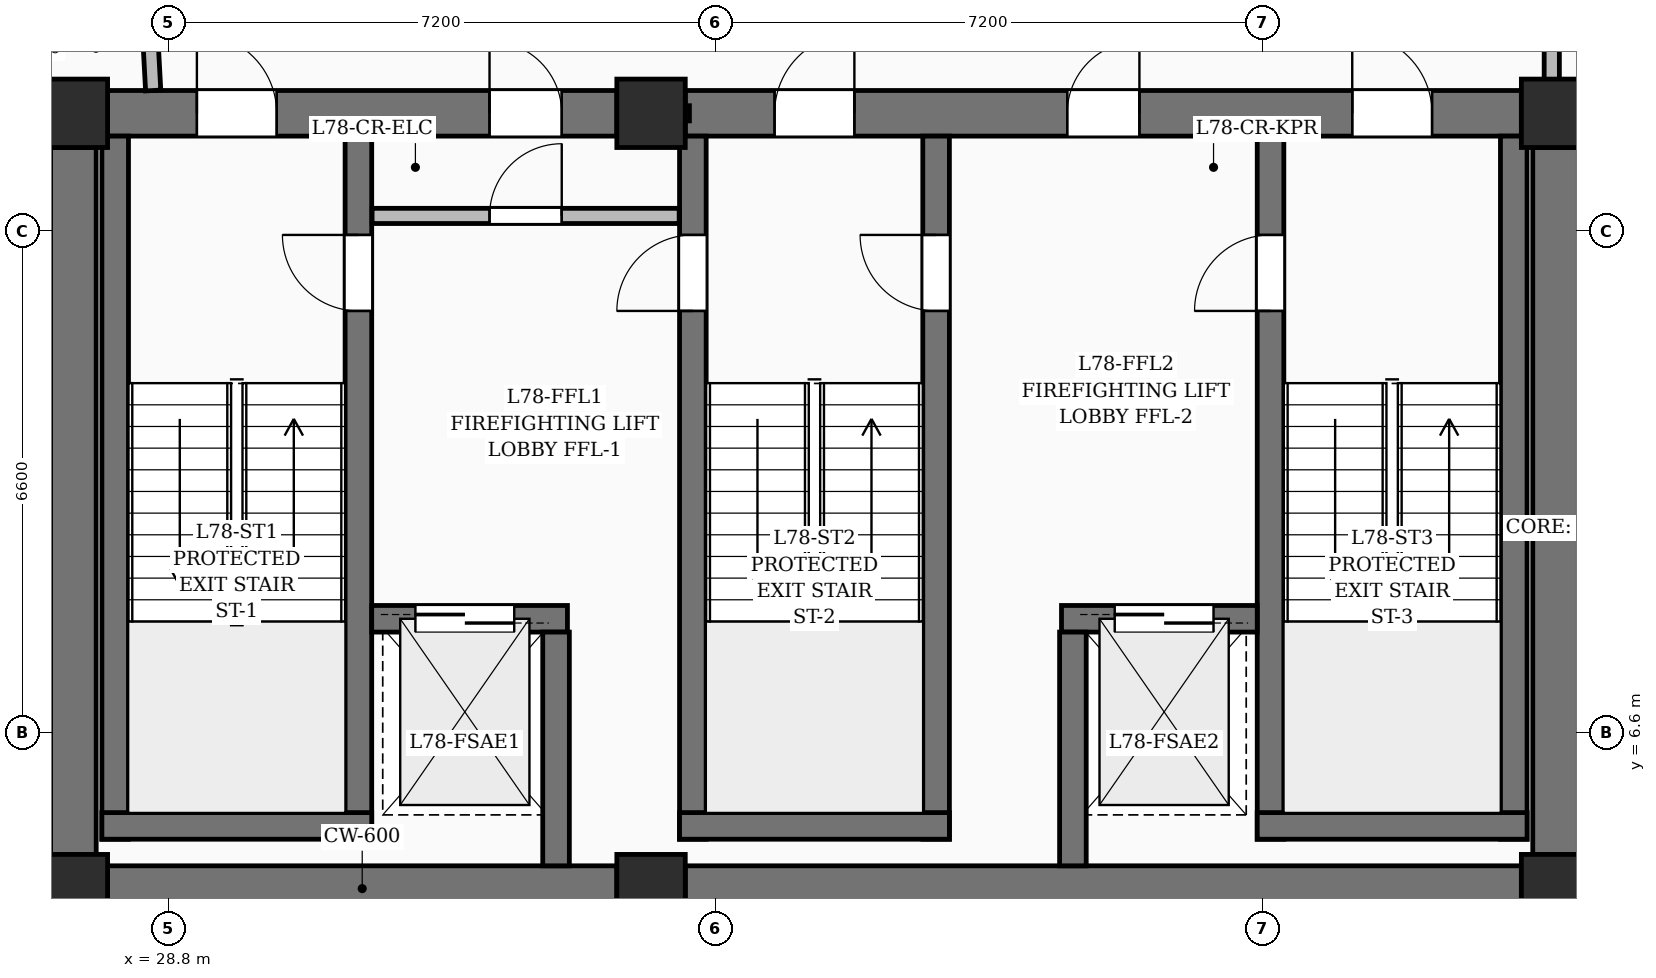
"""IFC4 building model, lengths in metres.
Left out: names, types, materials, properties, quantities, classifications, styles, units other than length and angle.
Written with IfcOpenShell. Run it as: python <this file> out.ifc"""

import sys

from ifc_helpers import new_model, si_unit, direction, frame, frame_2d, origin, origin_2d, place, context, subcontext, project, spatial, rectangle, extrude, element, fill, save


model = new_model("IFC4")
c1 = context("Model", 3, precision=1e-05, world=origin(), true_north=direction((0.0, 1.0)))
c2 = subcontext(c1, "Body", "Model", "MODEL_VIEW")
j1 = project(units=[si_unit("LENGTHUNIT", "METRE"), si_unit("PLANEANGLEUNIT", "RADIAN")], contexts=[c1])
p1 = place(None, origin())
s1 = spatial("IfcSite", under=j1, at=p1, CompositionType="ELEMENT")
p2 = place(p1, origin())
s2 = spatial("IfcBuilding", under=s1, at=p2, CompositionType="ELEMENT")
p3 = place(p2, frame((0.0, 0.0, 302.5)))
s3 = spatial("IfcBuildingStorey", under=s2, at=p3, CompositionType="ELEMENT", Elevation=302.5)
for number, where, z_axis, x_axis in (
    (1, (27.55, 4.55, 0.0), (0.0, 0.0, 1.0), (1.0, 0.0, 0.0)),
    (2, (35.15, 4.55, 0.0), (0.0, 0.0, 1.0), (1.0, 0.0, 0.0)),
    (3, (47.05, 4.55, 0.0), (0.0, 0.0, 1.0), (1.0, 0.0, 0.0)),
    (4, (27.55, 14.75, 0.0), (0.0, 0.0, 1.0), (1.0, 0.0, 0.0)),
    (5, (35.15, 14.75, 0.0), (0.0, 0.0, 1.0), (1.0, 0.0, 0.0)),
    (6, (47.05, 14.75, 0.0), (0.0, 0.0, 1.0), (1.0, 0.0, 0.0)),
):
    element("IfcColumn", number, at=place(p3, frame(where, z_axis=z_axis, x_axis=x_axis)), inside=s3, PredefinedType="COLUMN", context=c2, shape_type="SweptSolid", body=[
        extrude(rectangle(XDim=0.9, YDim=0.9, at=origin_2d()), origin(), (0.0, 0.0, 1.0), 4.0),
    ])
p4 = place(p3, frame((28.0, 4.55, 0.0), z_axis=(0.0, 0.0, 1.0), x_axis=(1.0, 0.0, 0.0)))
e7 = element("IfcWall", 7, at=p4, inside=s3, PredefinedType="SHEAR", context=c2, shape_type="SweptSolid", body=[
    extrude(rectangle(XDim=6.7, YDim=0.6, at=frame_2d((3.35, 0.0))), origin(), (0.0, 0.0, 1.0), 4.0),
])
p5 = place(p3, frame((35.6, 4.55, 0.0), z_axis=(0.0, 0.0, 1.0), x_axis=(1.0, 0.0, 0.0)))
e8 = element("IfcWall", 8, at=p5, inside=s3, PredefinedType="SHEAR", context=c2, shape_type="SweptSolid", body=[
    extrude(rectangle(XDim=11.0, YDim=0.6, at=frame_2d((5.5, 0.0))), origin(), (0.0, 0.0, 1.0), 4.0),
])
p6 = place(p3, frame((28.0, 14.75, 0.0), z_axis=(0.0, 0.0, 1.0), x_axis=(1.0, 0.0, 0.0)))
e9 = element("IfcWall", 9, at=p6, inside=s3, PredefinedType="SHEAR", context=c2, shape_type="SweptSolid", body=[
    extrude(rectangle(XDim=6.7, YDim=0.6, at=frame_2d((3.35, 0.0))), origin(), (0.0, 0.0, 1.0), 4.0),
])
p7 = place(p6, frame((1.175, 0.0, 0.0)))
e10 = element("IfcOpeningElement", 10, at=p7, cuts=e9, PredefinedType="OPENING", context=c2, shape_type="SweptSolid", body=[
    extrude(rectangle(XDim=1.05, YDim=2.15, at=frame_2d((0.525, 1.075))), frame((0.0, 0.31, 0.0), z_axis=(0.0, -1.0, 0.0), x_axis=(1.0, 0.0, 0.0)), (0.0, 0.0, 1.0), 0.62),
])
p8 = place(p6, frame((5.025, 0.0, 0.0)))
e11 = element("IfcOpeningElement", 11, at=p8, cuts=e9, PredefinedType="OPENING", context=c2, shape_type="SweptSolid", body=[
    extrude(rectangle(XDim=0.95, YDim=2.15, at=frame_2d((0.475, 1.075))), frame((0.0, 0.31, 0.0), z_axis=(0.0, -1.0, 0.0), x_axis=(1.0, 0.0, 0.0)), (0.0, 0.0, 1.0), 0.62),
])
p9 = place(p3, frame((35.6, 14.75, 0.0), z_axis=(0.0, 0.0, 1.0), x_axis=(1.0, 0.0, 0.0)))
e12 = element("IfcWall", 12, at=p9, inside=s3, PredefinedType="SHEAR", context=c2, shape_type="SweptSolid", body=[
    extrude(rectangle(XDim=11.0, YDim=0.6, at=frame_2d((5.5, 0.0))), origin(), (0.0, 0.0, 1.0), 4.0),
])
p10 = place(p9, frame((1.175, 0.0, 0.0)))
e13 = element("IfcOpeningElement", 13, at=p10, cuts=e12, PredefinedType="OPENING", context=c2, shape_type="SweptSolid", body=[
    extrude(rectangle(XDim=1.05, YDim=2.15, at=frame_2d((0.525, 1.075))), frame((0.0, 0.31, 0.0), z_axis=(0.0, -1.0, 0.0), x_axis=(1.0, 0.0, 0.0)), (0.0, 0.0, 1.0), 0.62),
])
p11 = place(p9, frame((8.775, 0.0, 0.0)))
e14 = element("IfcOpeningElement", 14, at=p11, cuts=e12, PredefinedType="OPENING", context=c2, shape_type="SweptSolid", body=[
    extrude(rectangle(XDim=1.05, YDim=2.15, at=frame_2d((0.525, 1.075))), frame((0.0, 0.31, 0.0), z_axis=(0.0, -1.0, 0.0), x_axis=(1.0, 0.0, 0.0)), (0.0, 0.0, 1.0), 0.62),
])
p12 = place(p9, frame((5.025, 0.0, 0.0)))
e15 = element("IfcOpeningElement", 15, at=p12, cuts=e12, PredefinedType="OPENING", context=c2, shape_type="SweptSolid", body=[
    extrude(rectangle(XDim=0.95, YDim=2.15, at=frame_2d((0.475, 1.075))), frame((0.0, 0.31, 0.0), z_axis=(0.0, -1.0, 0.0), x_axis=(1.0, 0.0, 0.0)), (0.0, 0.0, 1.0), 0.62),
])
for number, where, z_axis, x_axis in (
    (16, (27.55, 5.0, 0.0), (0.0, 0.0, 1.0), (0.0, 1.0, 0.0)),
    (17, (47.05, 5.0, 0.0), (0.0, 0.0, 1.0), (0.0, 1.0, 0.0)),
):
    element("IfcWall", number, at=place(p3, frame(where, z_axis=z_axis, x_axis=x_axis)), inside=s3, PredefinedType="SHEAR", context=c2, shape_type="SweptSolid", body=[
        extrude(rectangle(XDim=9.3, YDim=0.6, at=frame_2d((4.65, 0.0))), origin(), (0.0, 0.0, 1.0), 4.0),
    ])
p13 = place(p3, frame((28.1, 5.2, 0.0), z_axis=(0.0, 0.0, 1.0), x_axis=(0.0, 1.0, 0.0)))
e18 = element("IfcWall", 18, at=p13, inside=s3, PredefinedType="SOLIDWALL", context=c2, shape_type="SweptSolid", body=[
    extrude(rectangle(XDim=9.25, YDim=0.35, at=frame_2d((4.625, 0.0))), origin(), (0.0, 0.0, 1.0), 4.0),
])
p14 = place(p3, frame((31.3, 5.2, 0.0), z_axis=(0.0, 0.0, 1.0), x_axis=(0.0, 1.0, 0.0)))
e19 = element("IfcWall", 19, at=p14, inside=s3, PredefinedType="SOLIDWALL", context=c2, shape_type="SweptSolid", body=[
    extrude(rectangle(XDim=9.25, YDim=0.35, at=frame_2d((4.625, 0.0))), origin(), (0.0, 0.0, 1.0), 4.0),
])
p15 = place(p14, frame((6.95, 0.0, 0.0)))
e20 = element("IfcOpeningElement", 20, at=p15, cuts=e19, PredefinedType="OPENING", context=c2, shape_type="SweptSolid", body=[
    extrude(rectangle(XDim=1.0, YDim=2.15, at=frame_2d((0.5, 1.075))), frame((0.0, 0.185, 0.0), z_axis=(0.0, -1.0, 0.0), x_axis=(1.0, 0.0, 0.0)), (0.0, 0.0, 1.0), 0.37),
])
p16 = place(p3, frame((27.925, 5.375, 0.0), z_axis=(0.0, 0.0, 1.0), x_axis=(1.0, 0.0, 0.0)))
e21 = element("IfcWall", 21, at=p16, inside=s3, PredefinedType="SOLIDWALL", context=c2, shape_type="SweptSolid", body=[
    extrude(rectangle(XDim=3.55, YDim=0.35, at=frame_2d((1.775, 0.0))), origin(), (0.0, 0.0, 1.0), 4.0),
])
p17 = place(p3, frame((35.7, 5.2, 0.0), z_axis=(0.0, 0.0, 1.0), x_axis=(0.0, 1.0, 0.0)))
e22 = element("IfcWall", 22, at=p17, inside=s3, PredefinedType="SOLIDWALL", context=c2, shape_type="SweptSolid", body=[
    extrude(rectangle(XDim=9.25, YDim=0.35, at=frame_2d((4.625, 0.0))), origin(), (0.0, 0.0, 1.0), 4.0),
])
p18 = place(p17, frame((6.95, 0.0, 0.0)))
e23 = element("IfcOpeningElement", 23, at=p18, cuts=e22, PredefinedType="OPENING", context=c2, shape_type="SweptSolid", body=[
    extrude(rectangle(XDim=1.0, YDim=2.15, at=frame_2d((0.5, 1.075))), frame((0.0, 0.185, 0.0), z_axis=(0.0, -1.0, 0.0), x_axis=(1.0, 0.0, 0.0)), (0.0, 0.0, 1.0), 0.37),
])
p19 = place(p3, frame((38.9, 5.2, 0.0), z_axis=(0.0, 0.0, 1.0), x_axis=(0.0, 1.0, 0.0)))
e24 = element("IfcWall", 24, at=p19, inside=s3, PredefinedType="SOLIDWALL", context=c2, shape_type="SweptSolid", body=[
    extrude(rectangle(XDim=9.25, YDim=0.35, at=frame_2d((4.625, 0.0))), origin(), (0.0, 0.0, 1.0), 4.0),
])
p20 = place(p19, frame((6.95, 0.0, 0.0)))
e25 = element("IfcOpeningElement", 25, at=p20, cuts=e24, PredefinedType="OPENING", context=c2, shape_type="SweptSolid", body=[
    extrude(rectangle(XDim=1.0, YDim=2.15, at=frame_2d((0.5, 1.075))), frame((0.0, 0.185, 0.0), z_axis=(0.0, -1.0, 0.0), x_axis=(1.0, 0.0, 0.0)), (0.0, 0.0, 1.0), 0.37),
])
p21 = place(p3, frame((35.525, 5.375, 0.0), z_axis=(0.0, 0.0, 1.0), x_axis=(1.0, 0.0, 0.0)))
e26 = element("IfcWall", 26, at=p21, inside=s3, PredefinedType="SOLIDWALL", context=c2, shape_type="SweptSolid", body=[
    extrude(rectangle(XDim=3.55, YDim=0.35, at=frame_2d((1.775, 0.0))), origin(), (0.0, 0.0, 1.0), 4.0),
])
p22 = place(p3, frame((43.3, 5.2, 0.0), z_axis=(0.0, 0.0, 1.0), x_axis=(0.0, 1.0, 0.0)))
e27 = element("IfcWall", 27, at=p22, inside=s3, PredefinedType="SOLIDWALL", context=c2, shape_type="SweptSolid", body=[
    extrude(rectangle(XDim=9.25, YDim=0.35, at=frame_2d((4.625, 0.0))), origin(), (0.0, 0.0, 1.0), 4.0),
])
p23 = place(p22, frame((6.95, 0.0, 0.0)))
e28 = element("IfcOpeningElement", 28, at=p23, cuts=e27, PredefinedType="OPENING", context=c2, shape_type="SweptSolid", body=[
    extrude(rectangle(XDim=1.0, YDim=2.15, at=frame_2d((0.5, 1.075))), frame((0.0, 0.185, 0.0), z_axis=(0.0, -1.0, 0.0), x_axis=(1.0, 0.0, 0.0)), (0.0, 0.0, 1.0), 0.37),
])
p24 = place(p3, frame((46.5, 5.2, 0.0), z_axis=(0.0, 0.0, 1.0), x_axis=(0.0, 1.0, 0.0)))
e29 = element("IfcWall", 29, at=p24, inside=s3, PredefinedType="SOLIDWALL", context=c2, shape_type="SweptSolid", body=[
    extrude(rectangle(XDim=9.25, YDim=0.35, at=frame_2d((4.625, 0.0))), origin(), (0.0, 0.0, 1.0), 4.0),
])
p25 = place(p3, frame((43.125, 5.375, 0.0), z_axis=(0.0, 0.0, 1.0), x_axis=(1.0, 0.0, 0.0)))
e30 = element("IfcWall", 30, at=p25, inside=s3, PredefinedType="SOLIDWALL", context=c2, shape_type="SweptSolid", body=[
    extrude(rectangle(XDim=3.55, YDim=0.35, at=frame_2d((1.775, 0.0))), origin(), (0.0, 0.0, 1.0), 4.0),
])
p26 = place(p3, frame((31.475, 8.1, 0.0), z_axis=(0.0, 0.0, 1.0), x_axis=(1.0, 0.0, 0.0)))
e31 = element("IfcWall", 31, at=p26, inside=s3, PredefinedType="SOLIDWALL", context=c2, shape_type="SweptSolid", body=[
    extrude(rectangle(XDim=2.575, YDim=0.35, at=frame_2d((1.288, 0.0))), origin(), (0.0, 0.0, 1.0), 4.0),
])
p27 = place(p26, frame((0.575, 0.0, 0.0)))
e32 = element("IfcOpeningElement", 32, at=p27, cuts=e31, PredefinedType="OPENING", context=c2, shape_type="SweptSolid", body=[
    extrude(rectangle(XDim=1.3, YDim=2.25, at=frame_2d((0.65, 1.125))), frame((0.0, 0.185, 0.0), z_axis=(0.0, -1.0, 0.0), x_axis=(1.0, 0.0, 0.0)), (0.0, 0.0, 1.0), 0.37),
])
p28 = place(p3, frame((40.55, 8.1, 0.0), z_axis=(0.0, 0.0, 1.0), x_axis=(1.0, 0.0, 0.0)))
e33 = element("IfcWall", 33, at=p28, inside=s3, PredefinedType="SOLIDWALL", context=c2, shape_type="SweptSolid", body=[
    extrude(rectangle(XDim=2.575, YDim=0.35, at=frame_2d((1.288, 0.0))), origin(), (0.0, 0.0, 1.0), 4.0),
])
p29 = place(p28, frame((0.7, 0.0, 0.0)))
e34 = element("IfcOpeningElement", 34, at=p29, cuts=e33, PredefinedType="OPENING", context=c2, shape_type="SweptSolid", body=[
    extrude(rectangle(XDim=1.3, YDim=2.25, at=frame_2d((0.65, 1.125))), frame((0.0, 0.185, 0.0), z_axis=(0.0, -1.0, 0.0), x_axis=(1.0, 0.0, 0.0)), (0.0, 0.0, 1.0), 0.37),
])
for number, where, z_axis, x_axis in (
    (35, (33.9, 4.85, 0.0), (0.0, 0.0, 1.0), (0.0, 1.0, 0.0)),
    (36, (40.7, 4.85, 0.0), (0.0, 0.0, 1.0), (0.0, 1.0, 0.0)),
):
    element("IfcWall", number, at=place(p3, frame(where, z_axis=z_axis, x_axis=x_axis)), inside=s3, PredefinedType="SOLIDWALL", context=c2, shape_type="SweptSolid", body=[
        extrude(rectangle(XDim=3.075, YDim=0.35, at=frame_2d((1.538, 0.0))), origin(), (0.0, 0.0, 1.0), 4.0),
    ])
p30 = place(p3, frame((34.72, 14.75, 0.0), z_axis=(0.0, 0.0, 1.0), x_axis=(1.0, 0.0, 0.0)))
e37 = element("IfcWall", 37, at=p30, inside=s3, PredefinedType="PARTITIONING", context=c2, shape_type="SweptSolid", body=[
    extrude(rectangle(XDim=0.935, YDim=0.2, at=frame_2d((0.468, 0.0))), origin(), (0.0, 0.0, 1.0), 2.885),
])
p31 = place(p3, frame((31.48, 13.4, 0.0), z_axis=(0.0, 0.0, 1.0), x_axis=(1.0, 0.0, 0.0)))
e38 = element("IfcWall", 38, at=p31, inside=s3, PredefinedType="PARTITIONING", context=c2, shape_type="SweptSolid", body=[
    extrude(rectangle(XDim=4.04, YDim=0.2, at=frame_2d((2.02, 0.0))), origin(), (0.0, 0.0, 1.0), 3.7),
])
p32 = place(p31, frame((1.545, 0.0, 0.0)))
e39 = element("IfcOpeningElement", 39, at=p32, cuts=e38, PredefinedType="OPENING", context=c2, shape_type="SweptSolid", body=[
    extrude(rectangle(XDim=0.95, YDim=2.15, at=frame_2d((0.475, 1.075))), frame((0.0, 0.11, 0.0), z_axis=(0.0, -1.0, 0.0), x_axis=(1.0, 0.0, 0.0)), (0.0, 0.0, 1.0), 0.22),
])
p33 = place(p3, frame((28.496, 16.984, 0.0), z_axis=(0.0, 0.0, 1.0), x_axis=(0.053703478209, -0.998556926984, 0.0)))
e40 = element("IfcWall", 40, at=p33, inside=s3, PredefinedType="PARTITIONING", context=c2, shape_type="SweptSolid", body=[
    extrude(rectangle(XDim=1.937, YDim=0.2, at=frame_2d((0.968, 0.0))), origin(), (0.0, 0.0, 1.0), 3.035),
])
p34 = place(p3, frame((47.0, 15.05, 0.0), z_axis=(0.0, 0.0, 1.0), x_axis=(0.0, 1.0, 0.0)))
e41 = element("IfcWall", 41, at=p34, inside=s3, PredefinedType="PARTITIONING", context=c2, shape_type="SweptSolid", body=[
    extrude(rectangle(XDim=2.6, YDim=0.2, at=frame_2d((1.3, 0.0))), origin(), (0.0, 0.0, 1.0), 3.035),
])
p35 = place(p7, origin())
e42 = element("IfcDoor", 42, at=p35, inside=s3, OperationType="SINGLE_SWING_LEFT", PredefinedType="DOOR", context=c2, shape_type="SweptSolid", body=[
    extrude(rectangle(XDim=1.05, YDim=2.15, at=frame_2d((0.525, 1.075))), frame((0.0, 0.025, 0.0), z_axis=(0.0, -1.0, 0.0), x_axis=(1.0, 0.0, 0.0)), (0.0, 0.0, 1.0), 0.05),
])
fill(e10, e42)
p36 = place(p10, origin())
e43 = element("IfcDoor", 43, at=p36, inside=s3, OperationType="SINGLE_SWING_RIGHT", PredefinedType="DOOR", context=c2, shape_type="SweptSolid", body=[
    extrude(rectangle(XDim=1.05, YDim=2.15, at=frame_2d((0.525, 1.075))), frame((0.0, 0.025, 0.0), z_axis=(0.0, -1.0, 0.0), x_axis=(1.0, 0.0, 0.0)), (0.0, 0.0, 1.0), 0.05),
])
fill(e13, e43)
p37 = place(p11, origin())
e44 = element("IfcDoor", 44, at=p37, inside=s3, OperationType="SINGLE_SWING_LEFT", PredefinedType="DOOR", context=c2, shape_type="SweptSolid", body=[
    extrude(rectangle(XDim=1.05, YDim=2.15, at=frame_2d((0.525, 1.075))), frame((0.0, 0.025, 0.0), z_axis=(0.0, -1.0, 0.0), x_axis=(1.0, 0.0, 0.0)), (0.0, 0.0, 1.0), 0.05),
])
fill(e14, e44)
p38 = place(p15, origin())
e45 = element("IfcDoor", 45, at=p38, inside=s3, OperationType="SINGLE_SWING_RIGHT", PredefinedType="DOOR", context=c2, shape_type="SweptSolid", body=[
    extrude(rectangle(XDim=1.0, YDim=2.15, at=frame_2d((0.5, 1.075))), frame((0.0, 0.025, 0.0), z_axis=(0.0, -1.0, 0.0), x_axis=(1.0, 0.0, 0.0)), (0.0, 0.0, 1.0), 0.05),
])
fill(e20, e45)
p39 = place(p18, origin())
e46 = element("IfcDoor", 46, at=p39, inside=s3, OperationType="SINGLE_SWING_LEFT", PredefinedType="DOOR", context=c2, shape_type="SweptSolid", body=[
    extrude(rectangle(XDim=1.0, YDim=2.15, at=frame_2d((0.5, 1.075))), frame((0.0, 0.025, 0.0), z_axis=(0.0, -1.0, 0.0), x_axis=(1.0, 0.0, 0.0)), (0.0, 0.0, 1.0), 0.05),
])
fill(e23, e46)
p40 = place(p20, origin())
e47 = element("IfcDoor", 47, at=p40, inside=s3, OperationType="SINGLE_SWING_RIGHT", PredefinedType="DOOR", context=c2, shape_type="SweptSolid", body=[
    extrude(rectangle(XDim=1.0, YDim=2.15, at=frame_2d((0.5, 1.075))), frame((0.0, 0.025, 0.0), z_axis=(0.0, -1.0, 0.0), x_axis=(1.0, 0.0, 0.0)), (0.0, 0.0, 1.0), 0.05),
])
fill(e25, e47)
p41 = place(p23, origin())
e48 = element("IfcDoor", 48, at=p41, inside=s3, OperationType="SINGLE_SWING_LEFT", PredefinedType="DOOR", context=c2, shape_type="SweptSolid", body=[
    extrude(rectangle(XDim=1.0, YDim=2.15, at=frame_2d((0.5, 1.075))), frame((0.0, 0.025, 0.0), z_axis=(0.0, -1.0, 0.0), x_axis=(1.0, 0.0, 0.0)), (0.0, 0.0, 1.0), 0.05),
])
fill(e28, e48)
p42 = place(p27, origin())
e49 = element("IfcDoor", 49, at=p42, inside=s3, OperationType="DOUBLE_DOOR_SLIDING", PredefinedType="DOOR", context=c2, shape_type="SweptSolid", body=[
    extrude(rectangle(XDim=1.3, YDim=2.25, at=frame_2d((0.65, 1.125))), frame((0.0, 0.025, 0.0), z_axis=(0.0, -1.0, 0.0), x_axis=(1.0, 0.0, 0.0)), (0.0, 0.0, 1.0), 0.05),
])
fill(e32, e49)
p43 = place(p29, origin())
e50 = element("IfcDoor", 50, at=p43, inside=s3, OperationType="DOUBLE_DOOR_SLIDING", PredefinedType="DOOR", context=c2, shape_type="SweptSolid", body=[
    extrude(rectangle(XDim=1.3, YDim=2.25, at=frame_2d((0.65, 1.125))), frame((0.0, 0.025, 0.0), z_axis=(0.0, -1.0, 0.0), x_axis=(1.0, 0.0, 0.0)), (0.0, 0.0, 1.0), 0.05),
])
fill(e34, e50)
p44 = place(p32, origin())
e51 = element("IfcDoor", 51, at=p44, inside=s3, OperationType="SINGLE_SWING_RIGHT", PredefinedType="DOOR", context=c2, shape_type="SweptSolid", body=[
    extrude(rectangle(XDim=0.95, YDim=2.15, at=frame_2d((0.475, 1.075))), frame((0.0, 0.025, 0.0), z_axis=(0.0, -1.0, 0.0), x_axis=(1.0, 0.0, 0.0)), (0.0, 0.0, 1.0), 0.05),
])
fill(e39, e51)
p45 = place(p8, origin())
e52 = element("IfcDoor", 52, at=p45, inside=s3, OperationType="SINGLE_SWING_LEFT", PredefinedType="DOOR", context=c2, shape_type="SweptSolid", body=[
    extrude(rectangle(XDim=0.95, YDim=2.15, at=frame_2d((0.475, 1.075))), frame((0.0, 0.025, 0.0), z_axis=(0.0, -1.0, 0.0), x_axis=(1.0, 0.0, 0.0)), (0.0, 0.0, 1.0), 0.05),
])
fill(e11, e52)
p46 = place(p12, origin())
e53 = element("IfcDoor", 53, at=p46, inside=s3, OperationType="SINGLE_SWING_RIGHT", PredefinedType="DOOR", context=c2, shape_type="SweptSolid", body=[
    extrude(rectangle(XDim=0.95, YDim=2.15, at=frame_2d((0.475, 1.075))), frame((0.0, 0.025, 0.0), z_axis=(0.0, -1.0, 0.0), x_axis=(1.0, 0.0, 0.0)), (0.0, 0.0, 1.0), 0.05),
])
fill(e15, e53)
save(model, sys.argv[1])
